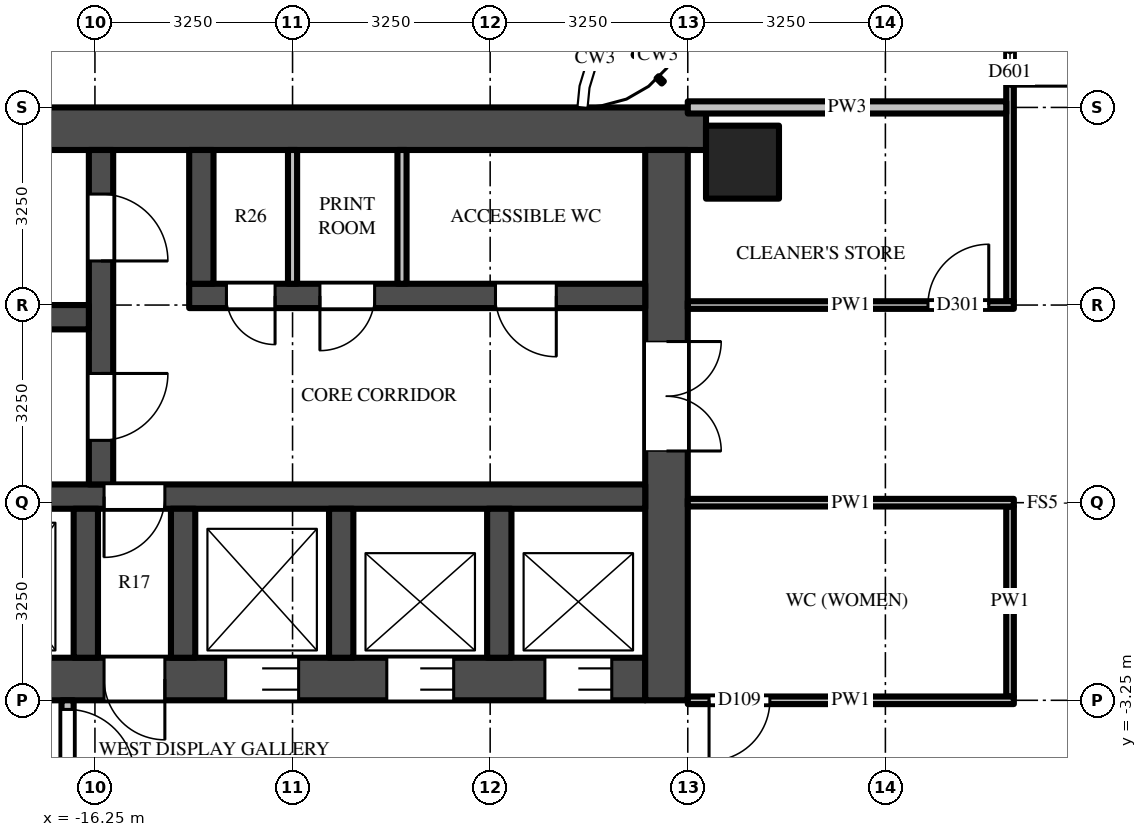
"""IFC4 building model, lengths in metres.
Left out: names, types, materials, properties, quantities, classifications, styles, units other than length and angle.
Written with IfcOpenShell. Run it as: python <this file> out.ifc"""

import sys

from ifc_helpers import new_model, si_unit, direction, frame, frame_2d, origin, origin_2d, place, context, subcontext, project, spatial, rectangle, extrude, source, transform, mapped, element, fill, save


model = new_model("IFC4")
c1 = context("Model", 3, precision=1e-05, world=origin(), true_north=direction((0.0, 1.0)))
c2 = subcontext(c1, "Body", "Model", "MODEL_VIEW")
j1 = project(units=[si_unit("LENGTHUNIT", "METRE"), si_unit("PLANEANGLEUNIT", "RADIAN")], contexts=[c1])
p1 = place(None, origin())
s1 = spatial("IfcSite", under=j1, at=p1, CompositionType="ELEMENT")
p2 = place(p1, origin())
s2 = spatial("IfcBuilding", under=s1, at=p2, CompositionType="ELEMENT")
p3 = place(p2, frame((0.0, 0.0, 177.6)))
s3 = spatial("IfcBuildingStorey", under=s2, at=p3, CompositionType="ELEMENT", Elevation=177.6)
m1 = source(origin(), c2, "Body", "SweptSolid", [
    extrude(rectangle(XDim=1.2, YDim=1.2, at=origin_2d()), origin(), (0.0, 0.0, 1.0), 3.9),
])
p4 = place(p3, frame((-5.6, 5.6, 0.0), z_axis=(0.0, 0.0, 1.0), x_axis=(1.0, 0.0, 0.0)))
e1 = element("IfcColumn", 1, at=p4, inside=s3, PredefinedType="COLUMN", context=c2, shape_type="MappedRepresentation", body=[
    mapped(m1, transform((0.0, 0.0, 0.0))),
])
m2 = source(origin(), c2, "Body", "SweptSolid", [
    extrude(rectangle(XDim=16.55, YDim=0.7, at=frame_2d((8.275, 0.0))), origin(), (0.0, 0.0, 1.0), 3.7),
])
p5 = place(p3, frame((-6.2, 6.15, 0.0), z_axis=(0.0, 0.0, 1.0), x_axis=(-1.0, 0.0, 0.0)))
e2 = element("IfcWall", 2, at=p5, inside=s3, PredefinedType="SHEAR", context=c2, shape_type="MappedRepresentation", body=[
    mapped(m2, transform((0.0, 0.0, 0.0))),
])
m3 = source(origin(), c2, "Body", "SweptSolid", [
    extrude(rectangle(XDim=14.85, YDim=0.7, at=frame_2d((7.425, 0.0))), origin(), (0.0, 0.0, 1.0), 3.7),
])
p6 = place(p3, frame((-7.2, -2.9, 0.0), z_axis=(0.0, 0.0, 1.0), x_axis=(-1.0, 0.0, 0.0)))
e3 = element("IfcWall", 3, at=p6, inside=s3, PredefinedType="SHEAR", context=c2, shape_type="MappedRepresentation", body=[
    mapped(m3, transform((0.0, 0.0, 0.0))),
])
m4 = source(origin(), c2, "Body", "SweptSolid", [
    extrude(rectangle(XDim=1.1, YDim=2.1, at=frame_2d((0.55, 1.05))), frame((0.0, 0.36, 0.0), z_axis=(0.0, -1.0, 0.0), x_axis=(1.0, 0.0, 0.0)), (0.0, 0.0, 1.0), 0.72),
])
p7 = place(p6, frame((0.55, 0.0, 0.0)))
e4 = element("IfcOpeningElement", 4, at=p7, cuts=e3, PredefinedType="OPENING", context=c2, shape_type="MappedRepresentation", body=[
    mapped(m4, transform((0.0, 0.0, 0.0))),
])
p8 = place(p6, frame((3.15, 0.0, 0.0)))
e5 = element("IfcOpeningElement", 5, at=p8, cuts=e3, PredefinedType="OPENING", context=c2, shape_type="MappedRepresentation", body=[
    mapped(m4, transform((0.0, 0.0, 0.0))),
])
m5 = source(origin(), c2, "Body", "SweptSolid", [
    extrude(rectangle(XDim=1.2, YDim=2.1, at=frame_2d((0.6, 1.05))), frame((0.0, 0.36, 0.0), z_axis=(0.0, -1.0, 0.0), x_axis=(1.0, 0.0, 0.0)), (0.0, 0.0, 1.0), 0.72),
])
p9 = place(p6, frame((5.7, 0.0, 0.0)))
e6 = element("IfcOpeningElement", 6, at=p9, cuts=e3, PredefinedType="OPENING", context=c2, shape_type="MappedRepresentation", body=[
    mapped(m5, transform((0.0, 0.0, 0.0))),
])
m6 = source(origin(), c2, "Body", "SweptSolid", [
    extrude(rectangle(XDim=1.3, YDim=2.1, at=frame_2d((0.65, 1.05))), frame((0.0, 0.36, 0.0), z_axis=(0.0, -1.0, 0.0), x_axis=(1.0, 0.0, 0.0)), (0.0, 0.0, 1.0), 0.72),
])
p10 = place(p6, frame((12.2, 0.0, 0.0)))
e7 = element("IfcOpeningElement", 7, at=p10, cuts=e3, PredefinedType="OPENING", context=c2, shape_type="MappedRepresentation", body=[
    mapped(m6, transform((0.0, 0.0, 0.0))),
])
p11 = place(p6, frame((9.85, 0.0, 0.0)))
e8 = element("IfcOpeningElement", 8, at=p11, cuts=e3, PredefinedType="OPENING", context=c2, shape_type="MappedRepresentation", body=[
    mapped(m5, transform((0.0, 0.0, 0.0))),
])
m7 = source(origin(), c2, "Body", "SweptSolid", [
    extrude(rectangle(XDim=1.0, YDim=2.1, at=frame_2d((0.5, 1.05))), frame((0.0, 0.36, 0.0), z_axis=(0.0, -1.0, 0.0), x_axis=(1.0, 0.0, 0.0)), (0.0, 0.0, 1.0), 0.72),
])
p12 = place(p6, frame((7.9, 0.0, 0.0)))
e9 = element("IfcOpeningElement", 9, at=p12, cuts=e3, PredefinedType="OPENING", context=c2, shape_type="MappedRepresentation", body=[
    mapped(m7, transform((0.0, 0.0, 0.0))),
])
m8 = source(origin(), c2, "Body", "SweptSolid", [
    extrude(rectangle(XDim=9.05, YDim=0.7, at=frame_2d((4.525, 0.0))), origin(), (0.0, 0.0, 1.0), 3.7),
])
p13 = place(p3, frame((-6.85, 5.8, 0.0), z_axis=(0.0, 0.0, 1.0), x_axis=(0.0, -1.0, 0.0)))
e10 = element("IfcWall", 10, at=p13, inside=s3, PredefinedType="SHEAR", context=c2, shape_type="MappedRepresentation", body=[
    mapped(m8, transform((0.0, 0.0, 0.0))),
])
m9 = source(origin(), c2, "Body", "SweptSolid", [
    extrude(rectangle(XDim=1.8, YDim=2.1, at=frame_2d((0.9, 1.05))), frame((0.0, 0.36, 0.0), z_axis=(0.0, -1.0, 0.0), x_axis=(1.0, 0.0, 0.0)), (0.0, 0.0, 1.0), 0.72),
])
p14 = place(p13, frame((3.15, 0.0, 0.0)))
e11 = element("IfcOpeningElement", 11, at=p14, cuts=e10, PredefinedType="OPENING", context=c2, shape_type="MappedRepresentation", body=[
    mapped(m9, transform((0.0, 0.0, 0.0))),
])
m10 = source(origin(), c2, "Body", "SweptSolid", [
    extrude(rectangle(XDim=7.5, YDim=0.4, at=frame_2d((3.75, 0.0))), origin(), (0.0, 0.0, 1.0), 3.7),
])
p15 = place(p3, frame((-7.2, 3.4, 0.0), z_axis=(0.0, 0.0, 1.0), x_axis=(-1.0, 0.0, 0.0)))
e12 = element("IfcWall", 12, at=p15, inside=s3, PredefinedType="SHEAR", context=c2, shape_type="MappedRepresentation", body=[
    mapped(m10, transform((0.0, 0.0, 0.0))),
])
m11 = source(origin(), c2, "Body", "SweptSolid", [
    extrude(rectangle(XDim=1.0, YDim=2.1, at=frame_2d((0.5, 1.05))), frame((0.0, 0.21, 0.0), z_axis=(0.0, -1.0, 0.0), x_axis=(1.0, 0.0, 0.0)), (0.0, 0.0, 1.0), 0.42),
])
p16 = place(p15, frame((1.462, 0.0, 0.0)))
e13 = element("IfcOpeningElement", 13, at=p16, cuts=e12, PredefinedType="OPENING", context=c2, shape_type="MappedRepresentation", body=[
    mapped(m11, transform((0.0, 0.0, 0.0))),
])
m12 = source(origin(), c2, "Body", "SweptSolid", [
    extrude(rectangle(XDim=0.9, YDim=2.1, at=frame_2d((0.45, 1.05))), frame((0.0, 0.21, 0.0), z_axis=(0.0, -1.0, 0.0), x_axis=(1.0, 0.0, 0.0)), (0.0, 0.0, 1.0), 0.42),
])
p17 = place(p15, frame((4.45, 0.0, 0.0)))
e14 = element("IfcOpeningElement", 14, at=p17, cuts=e12, PredefinedType="OPENING", context=c2, shape_type="MappedRepresentation", body=[
    mapped(m12, transform((0.0, 0.0, 0.0))),
])
m13 = source(origin(), c2, "Body", "SweptSolid", [
    extrude(rectangle(XDim=0.8, YDim=2.1, at=frame_2d((0.4, 1.05))), frame((0.0, 0.21, 0.0), z_axis=(0.0, -1.0, 0.0), x_axis=(1.0, 0.0, 0.0)), (0.0, 0.0, 1.0), 0.42),
])
p18 = place(p15, frame((6.087, 0.0, 0.0)))
e15 = element("IfcOpeningElement", 15, at=p18, cuts=e12, PredefinedType="OPENING", context=c2, shape_type="MappedRepresentation", body=[
    mapped(m13, transform((0.0, 0.0, 0.0))),
])
m14 = source(origin(), c2, "Body", "SweptSolid", [
    extrude(rectangle(XDim=14.85, YDim=0.4, at=frame_2d((7.425, 0.0))), origin(), (0.0, 0.0, 1.0), 3.7),
])
p19 = place(p3, frame((-7.2, 0.1, 0.0), z_axis=(0.0, 0.0, 1.0), x_axis=(-1.0, 0.0, 0.0)))
e16 = element("IfcWall", 16, at=p19, inside=s3, PredefinedType="SHEAR", context=c2, shape_type="MappedRepresentation", body=[
    mapped(m14, transform((0.0, 0.0, 0.0))),
])
p20 = place(p19, frame((7.9, 0.0, 0.0)))
e17 = element("IfcOpeningElement", 17, at=p20, cuts=e16, PredefinedType="OPENING", context=c2, shape_type="MappedRepresentation", body=[
    mapped(m11, transform((0.0, 0.0, 0.0))),
])
m15 = source(origin(), c2, "Body", "SweptSolid", [
    extrude(rectangle(XDim=5.5, YDim=0.4, at=frame_2d((2.75, 0.0))), origin(), (0.0, 0.0, 1.0), 3.7),
])
p21 = place(p3, frame((-16.15, 5.8, 0.0), z_axis=(0.0, 0.0, 1.0), x_axis=(0.0, -1.0, 0.0)))
e18 = element("IfcWall", 18, at=p21, inside=s3, PredefinedType="SHEAR", context=c2, shape_type="MappedRepresentation", body=[
    mapped(m15, transform((0.0, 0.0, 0.0))),
])
m16 = source(origin(), c2, "Body", "SweptSolid", [
    extrude(rectangle(XDim=1.1, YDim=2.1, at=frame_2d((0.55, 1.05))), frame((0.0, 0.21, 0.0), z_axis=(0.0, -1.0, 0.0), x_axis=(1.0, 0.0, 0.0)), (0.0, 0.0, 1.0), 0.42),
])
p22 = place(p21, frame((0.725, 0.0, 0.0)))
e19 = element("IfcOpeningElement", 19, at=p22, cuts=e18, PredefinedType="OPENING", context=c2, shape_type="MappedRepresentation", body=[
    mapped(m16, transform((0.0, 0.0, 0.0))),
])
p23 = place(p21, frame((3.675, 0.0, 0.0)))
e20 = element("IfcOpeningElement", 20, at=p23, cuts=e18, PredefinedType="OPENING", context=c2, shape_type="MappedRepresentation", body=[
    mapped(m16, transform((0.0, 0.0, 0.0))),
])
m17 = source(origin(), c2, "Body", "SweptSolid", [
    extrude(rectangle(XDim=5.7, YDim=0.4, at=frame_2d((2.85, 0.0))), origin(), (0.0, 0.0, 1.0), 3.7),
])
p24 = place(p3, frame((-16.35, 3.05, 0.0), z_axis=(0.0, 0.0, 1.0), x_axis=(-1.0, 0.0, 0.0)))
e21 = element("IfcWall", 21, at=p24, inside=s3, PredefinedType="SHEAR", context=c2, shape_type="MappedRepresentation", body=[
    mapped(m17, transform((0.0, 0.0, 0.0))),
])
m18 = source(origin(), c2, "Body", "SweptSolid", [
    extrude(rectangle(XDim=2.2, YDim=0.4, at=frame_2d((1.1, 0.0))), origin(), (0.0, 0.0, 1.0), 3.7),
])
p25 = place(p3, frame((-14.5, 5.8, 0.0), z_axis=(0.0, 0.0, 1.0), x_axis=(0.0, -1.0, 0.0)))
e22 = element("IfcWall", 22, at=p25, inside=s3, PredefinedType="SHEAR", context=c2, shape_type="MappedRepresentation", body=[
    mapped(m18, transform((0.0, 0.0, 0.0))),
])
m19 = source(origin(), c2, "Body", "SweptSolid", [
    extrude(rectangle(XDim=2.45, YDim=0.4, at=frame_2d((1.225, 0.0))), origin(), (0.0, 0.0, 1.0), 3.7),
])
for number, where, z_axis, x_axis in (
    (23, (-9.6, -0.1, 0.0), (0.0, 0.0, 1.0), (0.0, -1.0, 0.0)),
    (24, (-12.2, -0.1, 0.0), (0.0, 0.0, 1.0), (0.0, -1.0, 0.0)),
    (25, (-14.8, -0.1, 0.0), (0.0, 0.0, 1.0), (0.0, -1.0, 0.0)),
    (26, (-16.4, -0.1, 0.0), (0.0, 0.0, 1.0), (0.0, -1.0, 0.0)),
):
    element("IfcWall", number, at=place(p3, frame(where, z_axis=z_axis, x_axis=x_axis)), inside=s3, PredefinedType="SHEAR", context=c2, shape_type="MappedRepresentation", body=[
        mapped(m19, transform((0.0, 0.0, 0.0))),
    ])
m20 = source(origin(), c2, "Body", "SweptSolid", [
    extrude(rectangle(XDim=3.25, YDim=0.2, at=frame_2d((1.625, 0.0))), origin(), (0.0, 0.0, 1.0), 3.7),
])
p26 = place(p3, frame((-16.7, -3.25, 0.0), z_axis=(0.0, 0.0, 1.0), x_axis=(0.0, -1.0, 0.0)))
e27 = element("IfcWall", 27, at=p26, inside=s3, PredefinedType="PARTITIONING", context=c2, shape_type="MappedRepresentation", body=[
    mapped(m20, transform((0.0, 0.0, 0.0))),
])
m21 = source(origin(), c2, "Body", "SweptSolid", [
    extrude(rectangle(XDim=1.1, YDim=2.1, at=frame_2d((0.55, 1.05))), frame((0.0, 0.11, 0.0), z_axis=(0.0, -1.0, 0.0), x_axis=(1.0, 0.0, 0.0)), (0.0, 0.0, 1.0), 0.22),
])
p27 = place(p26, frame((0.15, 0.0, 0.0)))
e28 = element("IfcOpeningElement", 28, at=p27, cuts=e27, PredefinedType="OPENING", context=c2, shape_type="MappedRepresentation", body=[
    mapped(m21, transform((0.0, 0.0, 0.0))),
])
m22 = source(origin(), c2, "Body", "SweptSolid", [
    extrude(rectangle(XDim=2.2, YDim=0.15, at=frame_2d((1.1, 0.0))), origin(), (0.0, 0.0, 1.0), 3.7),
])
for number, where, z_axis, x_axis in (
    (29, (-11.2, 5.8, 0.0), (0.0, 0.0, 1.0), (0.0, -1.0, 0.0)),
    (30, (-13.0, 5.8, 0.0), (0.0, 0.0, 1.0), (0.0, -1.0, 0.0)),
):
    element("IfcWall", number, at=place(p3, frame(where, z_axis=z_axis, x_axis=x_axis)), inside=s3, PredefinedType="PARTITIONING", context=c2, shape_type="MappedRepresentation", body=[
        mapped(m22, transform((0.0, 0.0, 0.0))),
    ])
m23 = source(origin(), c2, "Body", "SweptSolid", [
    extrude(rectangle(XDim=3.125, YDim=0.125, at=frame_2d((1.562, 0.0))), origin(), (0.0, 0.0, 1.0), 3.068),
])
p28 = place(p3, frame((-1.2, -0.062, 0.0), z_axis=(0.0, 0.0, 1.0), x_axis=(0.0, -1.0, 0.0)))
e31 = element("IfcWall", 31, at=p28, inside=s3, PredefinedType="PARTITIONING", context=c2, shape_type="MappedRepresentation", body=[
    mapped(m23, transform((0.0, 0.0, 0.0))),
])
m24 = source(origin(), c2, "Body", "SweptSolid", [
    extrude(rectangle(XDim=8.725, YDim=0.125, at=frame_2d((4.363, 0.0))), origin(), (0.0, 0.0, 1.0), 2.997),
])
p29 = place(p3, frame((-1.2, 12.038, 0.0), z_axis=(0.0, 0.0, 1.0), x_axis=(0.0, -1.0, 0.0)))
e32 = element("IfcWall", 32, at=p29, inside=s3, PredefinedType="PARTITIONING", context=c2, shape_type="MappedRepresentation", body=[
    mapped(m24, transform((0.0, 0.0, 0.0))),
])
m25 = source(origin(), c2, "Body", "SweptSolid", [
    extrude(rectangle(XDim=1.2, YDim=2.1, at=frame_2d((0.6, 1.05))), frame((0.0, 0.073, 0.0), z_axis=(0.0, -1.0, 0.0), x_axis=(1.0, 0.0, 0.0)), (0.0, 0.0, 1.0), 0.145),
])
p30 = place(p29, frame((3.988, 0.0, 0.0)))
e33 = element("IfcOpeningElement", 33, at=p30, cuts=e32, PredefinedType="OPENING", context=c2, shape_type="MappedRepresentation", body=[
    mapped(m25, transform((0.0, 0.0, 0.0))),
])
m26 = source(origin(), c2, "Body", "SweptSolid", [
    extrude(rectangle(XDim=5.363, YDim=0.125, at=frame_2d((2.681, 0.0))), origin(), (0.0, 0.0, 1.0), 2.997),
])
p31 = place(p3, frame((-1.137, -3.25, 0.0), z_axis=(0.0, 0.0, 1.0), x_axis=(-1.0, 0.0, 0.0)))
e34 = element("IfcWall", 34, at=p31, inside=s3, PredefinedType="PARTITIONING", context=c2, shape_type="MappedRepresentation", body=[
    mapped(m26, transform((0.0, 0.0, 0.0))),
])
m27 = source(origin(), c2, "Body", "SweptSolid", [
    extrude(rectangle(XDim=1.0, YDim=2.1, at=frame_2d((0.5, 1.05))), frame((0.0, 0.073, 0.0), z_axis=(0.0, -1.0, 0.0), x_axis=(1.0, 0.0, 0.0)), (0.0, 0.0, 1.0), 0.145),
])
p32 = place(p31, frame((4.012, 0.0, 0.0)))
e35 = element("IfcOpeningElement", 35, at=p32, cuts=e34, PredefinedType="OPENING", context=c2, shape_type="MappedRepresentation", body=[
    mapped(m27, transform((0.0, 0.0, 0.0))),
])
p33 = place(p3, frame((-1.137, 0.0, 0.0), z_axis=(0.0, 0.0, 1.0), x_axis=(-1.0, 0.0, 0.0)))
e36 = element("IfcWall", 36, at=p33, inside=s3, PredefinedType="PARTITIONING", context=c2, shape_type="MappedRepresentation", body=[
    mapped(m26, transform((0.0, 0.0, 0.0))),
])
p34 = place(p3, frame((-6.5, 3.25, 0.0), z_axis=(0.0, 0.0, 1.0), x_axis=(1.0, 0.0, 0.0)))
e37 = element("IfcWall", 37, at=p34, inside=s3, PredefinedType="PARTITIONING", context=c2, shape_type="MappedRepresentation", body=[
    mapped(m26, transform((0.0, 0.0, 0.0))),
])
p35 = place(p34, frame((3.95, 0.0, 0.0)))
e38 = element("IfcOpeningElement", 38, at=p35, cuts=e37, PredefinedType="OPENING", context=c2, shape_type="MappedRepresentation", body=[
    mapped(m27, transform((0.0, 0.0, 0.0))),
])
m28 = source(origin(), c2, "Body", "SweptSolid", [
    extrude(rectangle(XDim=5.238, YDim=0.2, at=frame_2d((2.619, 0.0))), origin(), (0.0, 0.0, 1.0), 2.78),
])
p36 = place(p3, frame((-6.5, 6.5, 0.0), z_axis=(0.0, 0.0, 1.0), x_axis=(1.0, 0.0, 0.0)))
e39 = element("IfcWall", 39, at=p36, inside=s3, PredefinedType="PARTITIONING", context=c2, shape_type="MappedRepresentation", body=[
    mapped(m28, transform((0.0, 0.0, 0.0))),
])
m29 = source(origin(), c2, "Body", "SweptSolid", [
    extrude(rectangle(XDim=1.1, YDim=2.1, at=frame_2d((0.55, 1.05))), frame((0.0, -0.275, 0.0), z_axis=(0.0, -1.0, 0.0), x_axis=(1.0, 0.0, 0.0)), (0.0, 0.0, 1.0), 0.05),
])
p37 = place(p7, origin())
e40 = element("IfcDoor", 40, at=p37, inside=s3, OperationType="DOUBLE_DOOR_SLIDING", PredefinedType="DOOR", context=c2, shape_type="MappedRepresentation", body=[
    mapped(m29, transform((0.0, 0.0, 0.0))),
])
fill(e4, e40)
p38 = place(p8, origin())
e41 = element("IfcDoor", 41, at=p38, inside=s3, OperationType="DOUBLE_DOOR_SLIDING", PredefinedType="DOOR", context=c2, shape_type="MappedRepresentation", body=[
    mapped(m29, transform((0.0, 0.0, 0.0))),
])
fill(e5, e41)
m30 = source(origin(), c2, "Body", "SweptSolid", [
    extrude(rectangle(XDim=1.2, YDim=2.1, at=frame_2d((0.6, 1.05))), frame((0.0, -0.275, 0.0), z_axis=(0.0, -1.0, 0.0), x_axis=(1.0, 0.0, 0.0)), (0.0, 0.0, 1.0), 0.05),
])
p39 = place(p9, origin())
e42 = element("IfcDoor", 42, at=p39, inside=s3, OperationType="DOUBLE_DOOR_SLIDING", PredefinedType="DOOR", context=c2, shape_type="MappedRepresentation", body=[
    mapped(m30, transform((0.0, 0.0, 0.0))),
])
fill(e6, e42)
m31 = source(origin(), c2, "Body", "SweptSolid", [
    extrude(rectangle(XDim=1.8, YDim=2.1, at=frame_2d((0.9, 1.05))), frame((0.0, -0.275, 0.0), z_axis=(0.0, -1.0, 0.0), x_axis=(1.0, 0.0, 0.0)), (0.0, 0.0, 1.0), 0.05),
])
p40 = place(p14, origin())
e43 = element("IfcDoor", 43, at=p40, inside=s3, OperationType="DOUBLE_DOOR_SINGLE_SWING", PredefinedType="DOOR", context=c2, shape_type="MappedRepresentation", body=[
    mapped(m31, transform((0.0, 0.0, 0.0))),
])
fill(e11, e43)
m32 = source(origin(), c2, "Body", "SweptSolid", [
    extrude(rectangle(XDim=1.1, YDim=2.1, at=frame_2d((0.55, 1.05))), frame((0.0, 0.025, 0.0), z_axis=(0.0, -1.0, 0.0), x_axis=(1.0, 0.0, 0.0)), (0.0, 0.0, 1.0), 0.05),
])
p41 = place(p22, origin())
e44 = element("IfcDoor", 44, at=p41, inside=s3, OperationType="SINGLE_SWING_RIGHT", PredefinedType="DOOR", context=c2, shape_type="MappedRepresentation", body=[
    mapped(m32, transform((0.0, 0.0, 0.0))),
])
fill(e19, e44)
p42 = place(p23, origin())
e45 = element("IfcDoor", 45, at=p42, inside=s3, OperationType="SINGLE_SWING_LEFT", PredefinedType="DOOR", context=c2, shape_type="MappedRepresentation", body=[
    mapped(m32, transform((0.0, 0.0, 0.0))),
])
fill(e20, e45)
m33 = source(origin(), c2, "Body", "SweptSolid", [
    extrude(rectangle(XDim=1.0, YDim=2.1, at=frame_2d((0.5, 1.05))), frame((0.0, 0.025, 0.0), z_axis=(0.0, -1.0, 0.0), x_axis=(1.0, 0.0, 0.0)), (0.0, 0.0, 1.0), 0.05),
])
p43 = place(p20, origin())
e46 = element("IfcDoor", 46, at=p43, inside=s3, OperationType="SINGLE_SWING_RIGHT", PredefinedType="DOOR", context=c2, shape_type="MappedRepresentation", body=[
    mapped(m33, transform((0.0, 0.0, 0.0))),
])
fill(e17, e46)
m34 = source(origin(), c2, "Body", "SweptSolid", [
    extrude(rectangle(XDim=1.0, YDim=2.1, at=frame_2d((0.5, 1.05))), frame((0.0, -0.275, 0.0), z_axis=(0.0, -1.0, 0.0), x_axis=(1.0, 0.0, 0.0)), (0.0, 0.0, 1.0), 0.05),
])
p44 = place(p12, origin())
e47 = element("IfcDoor", 47, at=p44, inside=s3, OperationType="SINGLE_SWING_LEFT", PredefinedType="DOOR", context=c2, shape_type="MappedRepresentation", body=[
    mapped(m34, transform((0.0, 0.0, 0.0))),
])
fill(e9, e47)
p45 = place(p27, origin())
e48 = element("IfcDoor", 48, at=p45, inside=s3, OperationType="SINGLE_SWING_RIGHT", PredefinedType="DOOR", context=c2, shape_type="MappedRepresentation", body=[
    mapped(m32, transform((0.0, 0.0, 0.0))),
])
fill(e28, e48)
p46 = place(p16, origin())
e49 = element("IfcDoor", 49, at=p46, inside=s3, OperationType="SINGLE_SWING_LEFT", PredefinedType="DOOR", context=c2, shape_type="MappedRepresentation", body=[
    mapped(m33, transform((0.0, 0.0, 0.0))),
])
fill(e13, e49)
m35 = source(origin(), c2, "Body", "SweptSolid", [
    extrude(rectangle(XDim=0.9, YDim=2.1, at=frame_2d((0.45, 1.05))), frame((0.0, 0.025, 0.0), z_axis=(0.0, -1.0, 0.0), x_axis=(1.0, 0.0, 0.0)), (0.0, 0.0, 1.0), 0.05),
])
p47 = place(p17, origin())
e50 = element("IfcDoor", 50, at=p47, inside=s3, OperationType="SINGLE_SWING_RIGHT", PredefinedType="DOOR", context=c2, shape_type="MappedRepresentation", body=[
    mapped(m35, transform((0.0, 0.0, 0.0))),
])
fill(e14, e50)
m36 = source(origin(), c2, "Body", "SweptSolid", [
    extrude(rectangle(XDim=0.8, YDim=2.1, at=frame_2d((0.4, 1.05))), frame((0.0, 0.025, 0.0), z_axis=(0.0, -1.0, 0.0), x_axis=(1.0, 0.0, 0.0)), (0.0, 0.0, 1.0), 0.05),
])
p48 = place(p18, origin())
e51 = element("IfcDoor", 51, at=p48, inside=s3, OperationType="SINGLE_SWING_LEFT", PredefinedType="DOOR", context=c2, shape_type="MappedRepresentation", body=[
    mapped(m36, transform((0.0, 0.0, 0.0))),
])
fill(e15, e51)
p49 = place(p32, origin())
e52 = element("IfcDoor", 52, at=p49, inside=s3, OperationType="SINGLE_SWING_RIGHT", PredefinedType="DOOR", context=c2, shape_type="MappedRepresentation", body=[
    mapped(m33, transform((0.0, 0.0, 0.0))),
])
fill(e35, e52)
p50 = place(p35, origin())
e53 = element("IfcDoor", 53, at=p50, inside=s3, OperationType="SINGLE_SWING_RIGHT", PredefinedType="DOOR", context=c2, shape_type="MappedRepresentation", body=[
    mapped(m33, transform((0.0, 0.0, 0.0))),
])
fill(e38, e53)
m37 = source(origin(), c2, "Body", "SweptSolid", [
    extrude(rectangle(XDim=1.2, YDim=2.1, at=frame_2d((0.6, 1.05))), frame((0.0, 0.025, 0.0), z_axis=(0.0, -1.0, 0.0), x_axis=(1.0, 0.0, 0.0)), (0.0, 0.0, 1.0), 0.05),
])
p51 = place(p30, origin())
e54 = element("IfcDoor", 54, at=p51, inside=s3, OperationType="SINGLE_SWING_RIGHT", PredefinedType="DOOR", context=c2, shape_type="MappedRepresentation", body=[
    mapped(m37, transform((0.0, 0.0, 0.0))),
])
fill(e33, e54)
save(model, sys.argv[1])
